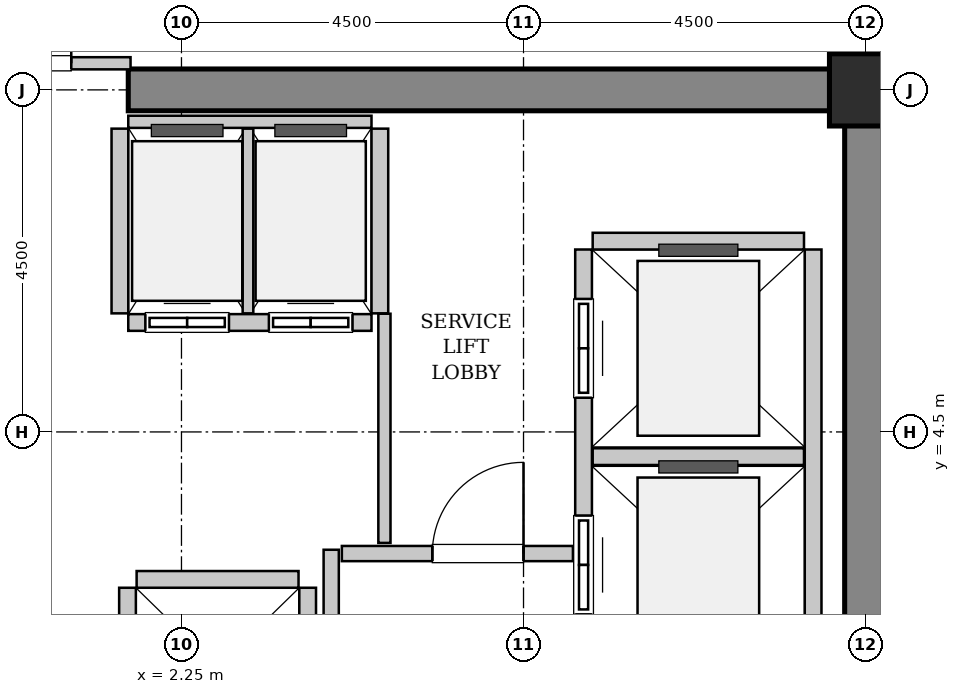
"""IFC4 building model, lengths in metres.
Left out: names, types, materials, properties, quantities, classifications, styles, units other than length and angle.
Written with IfcOpenShell. Run it as: python <this file> out.ifc"""

import sys

from ifc_helpers import new_model, si_unit, direction, frame, frame_2d, origin, origin_2d, place, context, subcontext, project, spatial, rectangle, hollow_rectangle, extrude, source, transform, mapped, element, fill, save


model = new_model("IFC4")
c1 = context("Model", 3, precision=1e-05, world=origin(), true_north=direction((0.0, 1.0)))
c2 = subcontext(c1, "Body", "Model", "MODEL_VIEW")
j1 = project(units=[si_unit("LENGTHUNIT", "METRE"), si_unit("PLANEANGLEUNIT", "RADIAN")], contexts=[c1])
p1 = place(None, origin())
s1 = spatial("IfcSite", under=j1, at=p1, CompositionType="ELEMENT")
p2 = place(p1, origin())
s2 = spatial("IfcBuilding", under=s1, at=p2, CompositionType="ELEMENT")
p3 = place(p2, frame((0.0, 0.0, 132.6)))
s3 = spatial("IfcBuildingStorey", under=s2, at=p3, CompositionType="ELEMENT", Elevation=132.6)
m1 = source(origin(), c2, "Body", "SweptSolid", [
    extrude(rectangle(XDim=9.975, YDim=0.55, at=frame_2d((4.987, 0.0))), origin(), (0.0, 0.0, 1.0), 3.8),
])
p4 = place(p3, frame((1.55, 9.0, 0.0), z_axis=(0.0, 0.0, 1.0), x_axis=(1.0, 0.0, 0.0)))
e1 = element("IfcWall", 1, at=p4, inside=s3, PredefinedType="SHEAR", context=c2, shape_type="MappedRepresentation", body=[
    mapped(m1, transform((0.0, 0.0, 0.0), x_axis=(1.0, 0.0, 0.0), y_axis=(0.0, 1.0, 0.0), z_axis=(0.0, 0.0, 1.0), scale=1.0)),
])
m2 = source(origin(), c2, "Body", "SweptSolid", [
    extrude(rectangle(XDim=7.375, YDim=0.55, at=frame_2d((3.688, 0.0))), origin(), (0.0, 0.0, 1.0), 3.8),
])
p5 = place(p3, frame((11.25, 1.35, 0.0), z_axis=(0.0, 0.0, 1.0), x_axis=(0.0, 1.0, 0.0)))
e2 = element("IfcWall", 2, at=p5, inside=s3, PredefinedType="SHEAR", context=c2, shape_type="MappedRepresentation", body=[
    mapped(m2, transform((0.0, 0.0, 0.0), x_axis=(1.0, 0.0, 0.0), y_axis=(0.0, 1.0, 0.0), z_axis=(0.0, 0.0, 1.0), scale=1.0)),
])
m3 = source(origin(), c2, "Body", "SweptSolid", [
    extrude(hollow_rectangle(XDim=0.95, YDim=0.95, WallThickness=0.045, InnerFilletRadius=0.045, OuterFilletRadius=0.09, at=origin_2d()), origin(), (0.0, 0.0, 1.0), 3.8),
])
p6 = place(p3, frame((11.25, 9.0, 0.0), z_axis=(0.0, 0.0, 1.0), x_axis=(1.0, 0.0, 0.0)))
e3 = element("IfcColumn", 3, at=p6, inside=s3, PredefinedType="COLUMN", context=c2, shape_type="MappedRepresentation", body=[
    mapped(m3, transform((0.0, 0.0, 0.0), x_axis=(1.0, 0.0, 0.0), y_axis=(0.0, 1.0, 0.0), z_axis=(0.0, 0.0, 1.0), scale=1.0)),
])
m4 = source(origin(), c2, "Body", "SweptSolid", [
    extrude(rectangle(XDim=5.45, YDim=0.22, at=frame_2d((2.725, 0.0))), origin(), (0.0, 0.0, 1.0), 3.535),
])
p7 = place(p3, frame((7.54, 6.9, 0.0), z_axis=(0.0, 0.0, 1.0), x_axis=(0.0, -1.0, 0.0)))
e4 = element("IfcWall", 4, at=p7, inside=s3, PredefinedType="SOLIDWALL", context=c2, shape_type="MappedRepresentation", body=[
    mapped(m4, transform((0.0, 0.0, 0.0), x_axis=(1.0, 0.0, 0.0), y_axis=(0.0, 1.0, 0.0), z_axis=(0.0, 0.0, 1.0), scale=1.0)),
])
p8 = place(p7, frame((3.5, 0.0, 0.0)))
e5 = element("IfcOpeningElement", 5, at=p8, cuts=e4, PredefinedType="OPENING", context=c2, shape_type="SweptSolid", body=[
    extrude(rectangle(XDim=1.3, YDim=2.3, at=frame_2d((0.65, 1.15))), frame((0.0, 0.12, 0.0), z_axis=(0.0, -1.0, 0.0), x_axis=(1.0, 0.0, 0.0)), (0.0, 0.0, 1.0), 0.24),
])
p9 = place(p7, frame((0.65, 0.0, 0.0)))
e6 = element("IfcOpeningElement", 6, at=p9, cuts=e4, PredefinedType="OPENING", context=c2, shape_type="SweptSolid", body=[
    extrude(rectangle(XDim=1.3, YDim=2.3, at=frame_2d((0.65, 1.15))), frame((0.0, 0.12, 0.0), z_axis=(0.0, -1.0, 0.0), x_axis=(1.0, 0.0, 0.0)), (0.0, 0.0, 1.0), 0.24),
])
p10 = place(p3, frame((10.56, 1.45, 0.0), z_axis=(0.0, 0.0, 1.0), x_axis=(0.0, 1.0, 0.0)))
e7 = element("IfcWall", 7, at=p10, inside=s3, PredefinedType="SOLIDWALL", context=c2, shape_type="MappedRepresentation", body=[
    mapped(m4, transform((0.0, 0.0, 0.0), x_axis=(1.0, 0.0, 0.0), y_axis=(0.0, 1.0, 0.0), z_axis=(0.0, 0.0, 1.0), scale=1.0)),
])
m5 = source(origin(), c2, "Body", "SweptSolid", [
    extrude(rectangle(XDim=2.78, YDim=0.22, at=frame_2d((1.39, 0.0))), origin(), (0.0, 0.0, 1.0), 3.535),
])
for number, where, z_axis, x_axis in (
    (8, (7.66, 4.175, 0.0), (0.0, 0.0, 1.0), (1.0, 0.0, 0.0)),
    (9, (10.44, 7.01, 0.0), (0.0, 0.0, 1.0), (-1.0, 0.0, 0.0)),
):
    element("IfcWall", number, at=place(p3, frame(where, z_axis=z_axis, x_axis=x_axis)), inside=s3, PredefinedType="SOLIDWALL", context=c2, shape_type="MappedRepresentation", body=[
        mapped(m5, transform((0.0, 0.0, 0.0), x_axis=(1.0, 0.0, 0.0), y_axis=(0.0, 1.0, 0.0), z_axis=(0.0, 0.0, 1.0), scale=1.0)),
    ])
m6 = source(origin(), c2, "Body", "SweptSolid", [
    extrude(rectangle(XDim=3.2, YDim=0.22, at=frame_2d((1.6, 0.0))), origin(), (0.0, 0.0, 1.0), 3.535),
])
p11 = place(p3, frame((1.55, 5.94, 0.0), z_axis=(0.0, 0.0, 1.0), x_axis=(1.0, 0.0, 0.0)))
e10 = element("IfcWall", 10, at=p11, inside=s3, PredefinedType="SOLIDWALL", context=c2, shape_type="MappedRepresentation", body=[
    mapped(m6, transform((0.0, 0.0, 0.0), x_axis=(1.0, 0.0, 0.0), y_axis=(0.0, 1.0, 0.0), z_axis=(0.0, 0.0, 1.0), scale=1.0)),
])
p12 = place(p11, frame((0.225, 0.0, 0.0)))
e11 = element("IfcOpeningElement", 11, at=p12, cuts=e10, PredefinedType="OPENING", context=c2, shape_type="SweptSolid", body=[
    extrude(rectangle(XDim=1.1, YDim=2.2, at=frame_2d((0.55, 1.1))), frame((0.0, 0.12, 0.0), z_axis=(0.0, -1.0, 0.0), x_axis=(1.0, 0.0, 0.0)), (0.0, 0.0, 1.0), 0.24),
])
p13 = place(p11, frame((1.85, 0.0, 0.0)))
e12 = element("IfcOpeningElement", 12, at=p13, cuts=e10, PredefinedType="OPENING", context=c2, shape_type="SweptSolid", body=[
    extrude(rectangle(XDim=1.1, YDim=2.2, at=frame_2d((0.55, 1.1))), frame((0.0, 0.12, 0.0), z_axis=(0.0, -1.0, 0.0), x_axis=(1.0, 0.0, 0.0)), (0.0, 0.0, 1.0), 0.24),
])
m7 = source(origin(), c2, "Body", "SweptSolid", [
    extrude(rectangle(XDim=3.2, YDim=0.16, at=frame_2d((1.6, 0.0))), origin(), (0.0, 0.0, 1.0), 2.425),
])
p14 = place(p3, frame((4.75, 8.58, 0.0), z_axis=(0.0, 0.0, 1.0), x_axis=(-1.0, 0.0, 0.0)))
e13 = element("IfcWall", 13, at=p14, inside=s3, PredefinedType="PARTITIONING", context=c2, shape_type="MappedRepresentation", body=[
    mapped(m7, transform((0.0, 0.0, 0.0), x_axis=(1.0, 0.0, 0.0), y_axis=(0.0, 1.0, 0.0), z_axis=(0.0, 0.0, 1.0), scale=1.0)),
])
m8 = source(origin(), c2, "Body", "SweptSolid", [
    extrude(rectangle(XDim=2.43, YDim=0.22, at=frame_2d((1.215, 0.0))), origin(), (0.0, 0.0, 1.0), 3.535),
])
p15 = place(p3, frame((1.44, 8.49, 0.0), z_axis=(0.0, 0.0, 1.0), x_axis=(0.0, -1.0, 0.0)))
e14 = element("IfcWall", 14, at=p15, inside=s3, PredefinedType="SOLIDWALL", context=c2, shape_type="MappedRepresentation", body=[
    mapped(m8, transform((0.0, 0.0, 0.0), x_axis=(1.0, 0.0, 0.0), y_axis=(0.0, 1.0, 0.0), z_axis=(0.0, 0.0, 1.0), scale=1.0)),
])
m9 = source(origin(), c2, "Body", "SweptSolid", [
    extrude(rectangle(XDim=2.43, YDim=0.14, at=frame_2d((1.215, 0.0))), origin(), (0.0, 0.0, 1.0), 3.535),
])
p16 = place(p3, frame((3.125, 6.06, 0.0), z_axis=(0.0, 0.0, 1.0), x_axis=(0.0, 1.0, 0.0)))
e15 = element("IfcWall", 15, at=p16, inside=s3, PredefinedType="PARTITIONING", context=c2, shape_type="MappedRepresentation", body=[
    mapped(m9, transform((0.0, 0.0, 0.0), x_axis=(1.0, 0.0, 0.0), y_axis=(0.0, 1.0, 0.0), z_axis=(0.0, 0.0, 1.0), scale=1.0)),
])
p17 = place(p3, frame((4.86, 6.06, 0.0), z_axis=(0.0, 0.0, 1.0), x_axis=(0.0, 1.0, 0.0)))
e16 = element("IfcWall", 16, at=p17, inside=s3, PredefinedType="SOLIDWALL", context=c2, shape_type="MappedRepresentation", body=[
    mapped(m8, transform((0.0, 0.0, 0.0), x_axis=(1.0, 0.0, 0.0), y_axis=(0.0, 1.0, 0.0), z_axis=(0.0, 0.0, 1.0), scale=1.0)),
])
m10 = source(origin(), c2, "Body", "SweptSolid", [
    extrude(rectangle(XDim=4.9, YDim=0.22, at=frame_2d((2.45, 0.0))), origin(), (0.0, 0.0, 1.0), 3.535),
])
for number, where, z_axis, x_axis in (
    (17, (1.54, 2.45, 0.0), (0.0, 0.0, 1.0), (0.0, -1.0, 0.0)),
    (18, (3.91, -2.45, 0.0), (0.0, 0.0, 1.0), (0.0, 1.0, 0.0)),
):
    element("IfcWall", number, at=place(p3, frame(where, z_axis=z_axis, x_axis=x_axis)), inside=s3, PredefinedType="SOLIDWALL", context=c2, shape_type="MappedRepresentation", body=[
        mapped(m10, transform((0.0, 0.0, 0.0), x_axis=(1.0, 0.0, 0.0), y_axis=(0.0, 1.0, 0.0), z_axis=(0.0, 0.0, 1.0), scale=1.0)),
    ])
m11 = source(origin(), c2, "Body", "SweptSolid", [
    extrude(rectangle(XDim=2.13, YDim=0.22, at=frame_2d((1.065, 0.0))), origin(), (0.0, 0.0, 1.0), 3.535),
])
p18 = place(p3, frame((3.79, 2.56, 0.0), z_axis=(0.0, 0.0, 1.0), x_axis=(-1.0, 0.0, 0.0)))
e19 = element("IfcWall", 19, at=p18, inside=s3, PredefinedType="SOLIDWALL", context=c2, shape_type="MappedRepresentation", body=[
    mapped(m11, transform((0.0, 0.0, 0.0), x_axis=(1.0, 0.0, 0.0), y_axis=(0.0, 1.0, 0.0), z_axis=(0.0, 0.0, 1.0), scale=1.0)),
])
m12 = source(origin(), c2, "Body", "SweptSolid", [
    extrude(rectangle(XDim=5.9, YDim=0.2, at=frame_2d((2.95, 0.0))), origin(), (0.0, 0.0, 1.0), 3.535),
])
p19 = place(p3, frame((4.22, -2.95, 0.0), z_axis=(0.0, 0.0, 1.0), x_axis=(0.0, 1.0, 0.0)))
e20 = element("IfcWall", 20, at=p19, inside=s3, PredefinedType="PARTITIONING", context=c2, shape_type="MappedRepresentation", body=[
    mapped(m12, transform((0.0, 0.0, 0.0), x_axis=(1.0, 0.0, 0.0), y_axis=(0.0, 1.0, 0.0), z_axis=(0.0, 0.0, 1.0), scale=1.0)),
])
m13 = source(origin(), c2, "Body", "SweptSolid", [
    extrude(rectangle(XDim=3.04, YDim=0.2, at=frame_2d((1.52, 0.0))), origin(), (0.0, 0.0, 1.0), 3.535),
])
p20 = place(p3, frame((4.36, 2.9, 0.0), z_axis=(0.0, 0.0, 1.0), x_axis=(1.0, 0.0, 0.0)))
e21 = element("IfcWall", 21, at=p20, inside=s3, PredefinedType="PARTITIONING", context=c2, shape_type="MappedRepresentation", body=[
    mapped(m13, transform((0.0, 0.0, 0.0), x_axis=(1.0, 0.0, 0.0), y_axis=(0.0, 1.0, 0.0), z_axis=(0.0, 0.0, 1.0), scale=1.0)),
])
p21 = place(p20, frame((1.19, 0.0, 0.0)))
e22 = element("IfcOpeningElement", 22, at=p21, cuts=e21, PredefinedType="OPENING", context=c2, shape_type="SweptSolid", body=[
    extrude(rectangle(XDim=1.2, YDim=2.15, at=frame_2d((0.6, 1.075))), frame((0.0, 0.11, 0.0), z_axis=(0.0, -1.0, 0.0), x_axis=(1.0, 0.0, 0.0)), (0.0, 0.0, 1.0), 0.22),
])
m14 = source(origin(), c2, "Body", "SweptSolid", [
    extrude(rectangle(XDim=3.16, YDim=0.16, at=frame_2d((1.58, 0.0))), origin(), (0.0, 0.0, 1.0), 2.425),
])
p22 = place(p3, frame((-1.58, 9.35, 0.0), z_axis=(0.0, 0.0, 1.0), x_axis=(1.0, 0.0, 0.0)))
e23 = element("IfcWall", 23, at=p22, inside=s3, PredefinedType="PARTITIONING", context=c2, shape_type="MappedRepresentation", body=[
    mapped(m14, transform((0.0, 0.0, 0.0), x_axis=(1.0, 0.0, 0.0), y_axis=(0.0, 1.0, 0.0), z_axis=(0.0, 0.0, 1.0), scale=1.0)),
])
p23 = place(p22, frame((0.78, 0.0, 0.0)))
e24 = element("IfcOpeningElement", 24, at=p23, cuts=e23, PredefinedType="OPENING", context=c2, shape_type="SweptSolid", body=[
    extrude(rectangle(XDim=1.6, YDim=2.3, at=frame_2d((0.8, 1.15))), frame((0.0, 0.09, 0.0), z_axis=(0.0, -1.0, 0.0), x_axis=(1.0, 0.0, 0.0)), (0.0, 0.0, 1.0), 0.18),
])
m15 = source(origin(), c2, "Body", "SweptSolid", [
    extrude(rectangle(XDim=3.015, YDim=0.16, at=frame_2d((1.507, 0.0))), origin(), (0.0, 0.0, 1.0), 3.535),
])
p24 = place(p3, frame((4.92, 3.04, 0.0), z_axis=(0.0, 0.0, 1.0), x_axis=(0.0, 1.0, 0.0)))
e25 = element("IfcWall", 25, at=p24, inside=s3, PredefinedType="PARTITIONING", context=c2, shape_type="MappedRepresentation", body=[
    mapped(m15, transform((0.0, 0.0, 0.0), x_axis=(1.0, 0.0, 0.0), y_axis=(0.0, 1.0, 0.0), z_axis=(0.0, 0.0, 1.0), scale=1.0)),
])
m16 = source(origin(), c2, "Body", "SweptSolid", [
    extrude(rectangle(XDim=1.3, YDim=2.3, at=frame_2d((0.65, 1.15))), frame((0.0, 0.025, 0.0), z_axis=(0.0, -1.0, 0.0), x_axis=(1.0, 0.0, 0.0)), (0.0, 0.0, 1.0), 0.05),
])
p25 = place(p8, origin())
e26 = element("IfcDoor", 26, at=p25, inside=s3, OperationType="SLIDING_TO_RIGHT", PredefinedType="DOOR", context=c2, shape_type="MappedRepresentation", body=[
    mapped(m16, transform((0.0, 0.0, 0.0), x_axis=(1.0, 0.0, 0.0), y_axis=(0.0, 1.0, 0.0), z_axis=(0.0, 0.0, 1.0), scale=1.0)),
])
fill(e5, e26)
p26 = place(p9, origin())
e27 = element("IfcDoor", 27, at=p26, inside=s3, OperationType="SLIDING_TO_RIGHT", PredefinedType="DOOR", context=c2, shape_type="MappedRepresentation", body=[
    mapped(m16, transform((0.0, 0.0, 0.0), x_axis=(1.0, 0.0, 0.0), y_axis=(0.0, 1.0, 0.0), z_axis=(0.0, 0.0, 1.0), scale=1.0)),
])
fill(e6, e27)
m17 = source(origin(), c2, "Body", "SweptSolid", [
    extrude(rectangle(XDim=1.1, YDim=2.2, at=frame_2d((0.55, 1.1))), frame((0.0, 0.025, 0.0), z_axis=(0.0, -1.0, 0.0), x_axis=(1.0, 0.0, 0.0)), (0.0, 0.0, 1.0), 0.05),
])
p27 = place(p12, origin())
e28 = element("IfcDoor", 28, at=p27, inside=s3, OperationType="DOUBLE_DOOR_SLIDING", PredefinedType="DOOR", context=c2, shape_type="MappedRepresentation", body=[
    mapped(m17, transform((0.0, 0.0, 0.0), x_axis=(1.0, 0.0, 0.0), y_axis=(0.0, 1.0, 0.0), z_axis=(0.0, 0.0, 1.0), scale=1.0)),
])
fill(e11, e28)
p28 = place(p13, origin())
e29 = element("IfcDoor", 29, at=p28, inside=s3, OperationType="DOUBLE_DOOR_SLIDING", PredefinedType="DOOR", context=c2, shape_type="MappedRepresentation", body=[
    mapped(m17, transform((0.0, 0.0, 0.0), x_axis=(1.0, 0.0, 0.0), y_axis=(0.0, 1.0, 0.0), z_axis=(0.0, 0.0, 1.0), scale=1.0)),
])
fill(e12, e29)
m18 = source(origin(), c2, "Body", "SweptSolid", [
    extrude(rectangle(XDim=1.2, YDim=2.15, at=frame_2d((0.6, 1.075))), frame((0.0, 0.025, 0.0), z_axis=(0.0, -1.0, 0.0), x_axis=(1.0, 0.0, 0.0)), (0.0, 0.0, 1.0), 0.05),
])
p29 = place(p21, origin())
e30 = element("IfcDoor", 30, at=p29, inside=s3, OperationType="SINGLE_SWING_RIGHT", PredefinedType="DOOR", context=c2, shape_type="MappedRepresentation", body=[
    mapped(m18, transform((0.0, 0.0, 0.0), x_axis=(1.0, 0.0, 0.0), y_axis=(0.0, 1.0, 0.0), z_axis=(0.0, 0.0, 1.0), scale=1.0)),
])
fill(e22, e30)
m19 = source(origin(), c2, "Body", "SweptSolid", [
    extrude(rectangle(XDim=1.6, YDim=2.3, at=frame_2d((0.8, 1.15))), frame((0.0, 0.025, 0.0), z_axis=(0.0, -1.0, 0.0), x_axis=(1.0, 0.0, 0.0)), (0.0, 0.0, 1.0), 0.05),
])
p30 = place(p23, origin())
e31 = element("IfcDoor", 31, at=p30, inside=s3, OperationType="DOUBLE_DOOR_SINGLE_SWING", PredefinedType="DOOR", context=c2, shape_type="MappedRepresentation", body=[
    mapped(m19, transform((0.0, 0.0, 0.0), x_axis=(1.0, 0.0, 0.0), y_axis=(0.0, 1.0, 0.0), z_axis=(0.0, 0.0, 1.0), scale=1.0)),
])
fill(e24, e31)
save(model, sys.argv[1])
